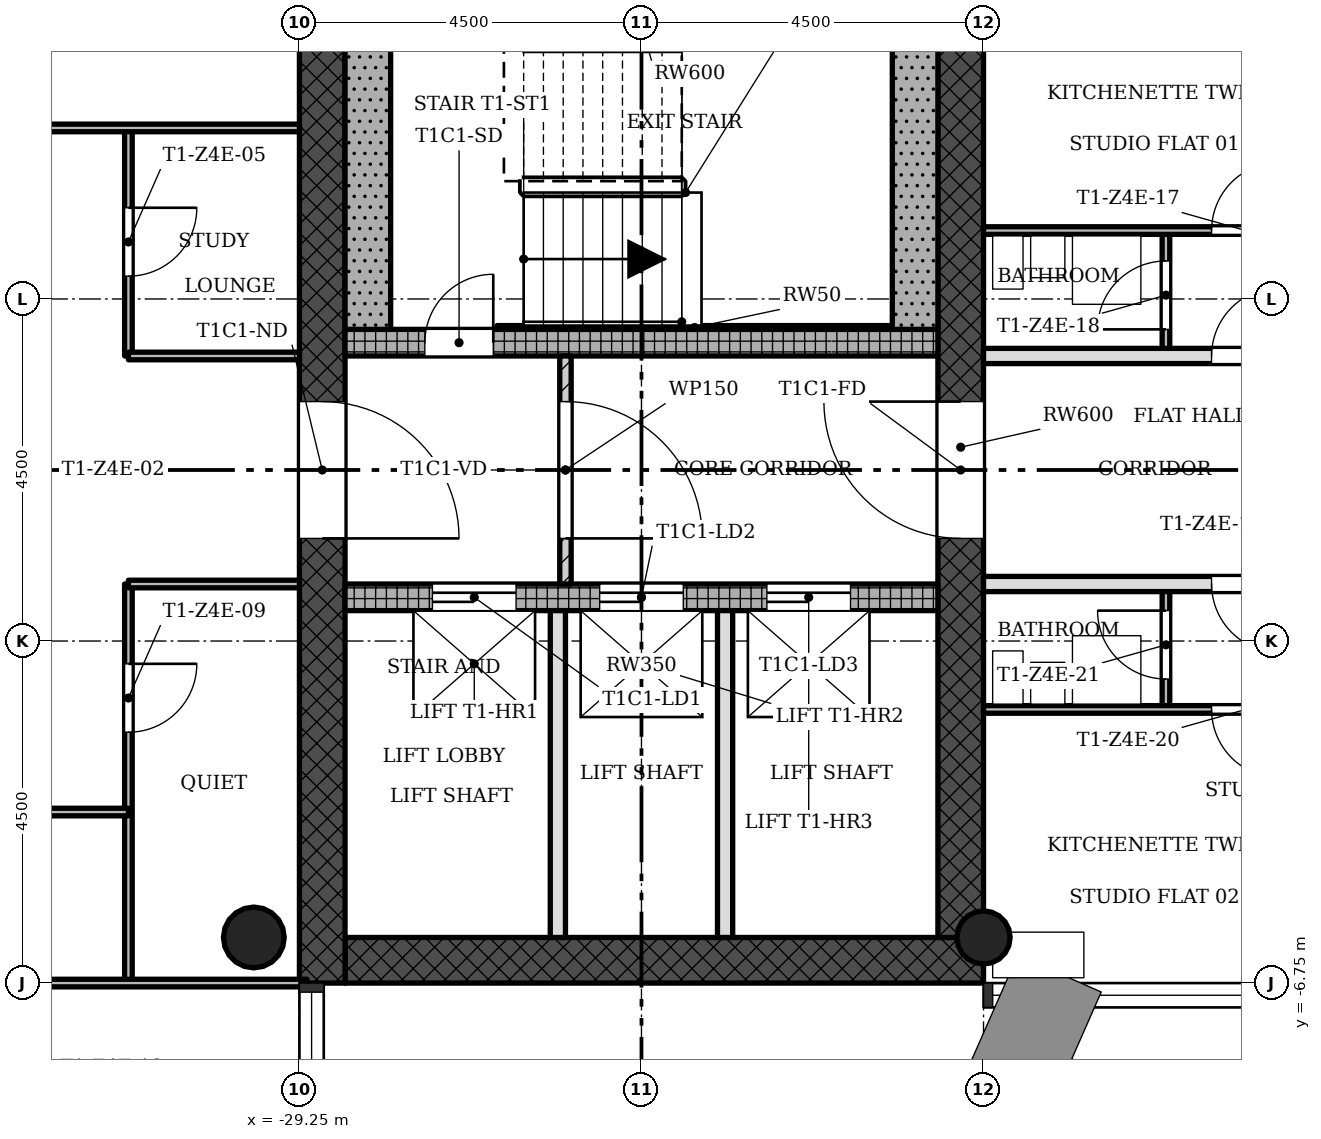
"""IFC4 building model, lengths in metres.
Left out: names, types, materials, properties, quantities, classifications, styles, units other than length and angle.
Written with IfcOpenShell. Run it as: python <this file> out.ifc"""

import sys

from ifc_helpers import new_model, si_unit, direction, frame, frame_2d, origin, origin_2d, place, context, subcontext, project, spatial, rectangle, hollow_circle, extrude, element, fill, save


model = new_model("IFC4")
c1 = context("Model", 3, precision=1e-05, world=origin(), true_north=direction((0.0, 1.0)))
c2 = subcontext(c1, "Body", "Model", "MODEL_VIEW")
j1 = project(units=[si_unit("LENGTHUNIT", "METRE"), si_unit("PLANEANGLEUNIT", "RADIAN")], contexts=[c1])
p1 = place(None, origin())
s1 = spatial("IfcSite", under=j1, at=p1, CompositionType="ELEMENT")
p2 = place(p1, origin())
s2 = spatial("IfcBuilding", under=s1, at=p2, CompositionType="ELEMENT")
p3 = place(p2, frame((0.0, 0.0, 209.6)))
s3 = spatial("IfcBuildingStorey", under=s2, at=p3, CompositionType="ELEMENT", Elevation=209.6)
p4 = place(p3, frame((-28.65, -6.45, 0.0), z_axis=(0.0, 0.0, 1.0), x_axis=(1.0, 0.0, 0.0)))
e1 = element("IfcWall", 1, at=p4, inside=s3, PredefinedType="SHEAR", context=c2, shape_type="SweptSolid", body=[
    extrude(rectangle(XDim=8.4, YDim=0.6, at=frame_2d((4.2, 0.0))), origin(), (0.0, 0.0, 1.0), 3.4),
])
p5 = place(p3, frame((-20.55, -6.15, 0.0), z_axis=(0.0, 0.0, 1.0), x_axis=(0.0, 1.0, 0.0)))
e2 = element("IfcWall", 2, at=p5, inside=s3, PredefinedType="SHEAR", context=c2, shape_type="SweptSolid", body=[
    extrude(rectangle(XDim=12.9, YDim=0.6, at=frame_2d((6.45, 0.0))), origin(), (0.0, 0.0, 1.0), 3.4),
])
p6 = place(p5, frame((5.25, 0.0, 0.0)))
e3 = element("IfcOpeningElement", 3, at=p6, cuts=e2, PredefinedType="OPENING", context=c2, shape_type="SweptSolid", body=[
    extrude(rectangle(XDim=1.8, YDim=2.1, at=frame_2d((0.9, 1.05))), frame((0.0, 0.31, 0.0), z_axis=(0.0, -1.0, 0.0), x_axis=(1.0, 0.0, 0.0)), (0.0, 0.0, 1.0), 0.62),
])
p7 = place(p3, frame((-28.95, 6.15, 0.0), z_axis=(0.0, 0.0, 1.0), x_axis=(0.0, -1.0, 0.0)))
e4 = element("IfcWall", 4, at=p7, inside=s3, PredefinedType="SHEAR", context=c2, shape_type="SweptSolid", body=[
    extrude(rectangle(XDim=12.9, YDim=0.6, at=frame_2d((6.45, 0.0))), origin(), (0.0, 0.0, 1.0), 3.4),
])
p8 = place(p7, frame((5.25, 0.0, 0.0)))
e5 = element("IfcOpeningElement", 5, at=p8, cuts=e4, PredefinedType="OPENING", context=c2, shape_type="SweptSolid", body=[
    extrude(rectangle(XDim=1.8, YDim=2.1, at=frame_2d((0.9, 1.05))), frame((0.0, 0.31, 0.0), z_axis=(0.0, -1.0, 0.0), x_axis=(1.0, 0.0, 0.0)), (0.0, 0.0, 1.0), 0.62),
])
p9 = place(p3, frame((-28.65, -1.675, 0.0), z_axis=(0.0, 0.0, 1.0), x_axis=(1.0, 0.0, 0.0)))
e6 = element("IfcWall", 6, at=p9, inside=s3, PredefinedType="SHEAR", context=c2, shape_type="SweptSolid", body=[
    extrude(rectangle(XDim=7.8, YDim=0.35, at=frame_2d((3.9, 0.0))), origin(), (0.0, 0.0, 1.0), 3.4),
])
p10 = place(p9, frame((1.15, 0.0, 0.0)))
e7 = element("IfcOpeningElement", 7, at=p10, cuts=e6, PredefinedType="OPENING", context=c2, shape_type="SweptSolid", body=[
    extrude(rectangle(XDim=1.1, YDim=2.1, at=frame_2d((0.55, 1.05))), frame((0.0, 0.185, 0.0), z_axis=(0.0, -1.0, 0.0), x_axis=(1.0, 0.0, 0.0)), (0.0, 0.0, 1.0), 0.37),
])
p11 = place(p9, frame((3.35, 0.0, 0.0)))
e8 = element("IfcOpeningElement", 8, at=p11, cuts=e6, PredefinedType="OPENING", context=c2, shape_type="SweptSolid", body=[
    extrude(rectangle(XDim=1.1, YDim=2.1, at=frame_2d((0.55, 1.05))), frame((0.0, 0.185, 0.0), z_axis=(0.0, -1.0, 0.0), x_axis=(1.0, 0.0, 0.0)), (0.0, 0.0, 1.0), 0.37),
])
p12 = place(p9, frame((5.55, 0.0, 0.0)))
e9 = element("IfcOpeningElement", 9, at=p12, cuts=e6, PredefinedType="OPENING", context=c2, shape_type="SweptSolid", body=[
    extrude(rectangle(XDim=1.1, YDim=2.1, at=frame_2d((0.55, 1.05))), frame((0.0, 0.185, 0.0), z_axis=(0.0, -1.0, 0.0), x_axis=(1.0, 0.0, 0.0)), (0.0, 0.0, 1.0), 0.37),
])
p13 = place(p3, frame((-28.65, 1.675, 0.0), z_axis=(0.0, 0.0, 1.0), x_axis=(1.0, 0.0, 0.0)))
e10 = element("IfcWall", 10, at=p13, inside=s3, PredefinedType="SHEAR", context=c2, shape_type="SweptSolid", body=[
    extrude(rectangle(XDim=7.8, YDim=0.35, at=frame_2d((3.9, 0.0))), origin(), (0.0, 0.0, 1.0), 3.4),
])
p14 = place(p13, frame((1.05, 0.0, 0.0)))
e11 = element("IfcOpeningElement", 11, at=p14, cuts=e10, PredefinedType="OPENING", context=c2, shape_type="SweptSolid", body=[
    extrude(rectangle(XDim=0.9, YDim=2.1, at=frame_2d((0.45, 1.05))), frame((0.0, 0.185, 0.0), z_axis=(0.0, -1.0, 0.0), x_axis=(1.0, 0.0, 0.0)), (0.0, 0.0, 1.0), 0.37),
])
p15 = place(p3, frame((-20.25, -6.15, 0.0), z_axis=(0.0, 0.0, 1.0), x_axis=(1.0, 0.0, 0.0)))
e12 = element("IfcColumn", 12, at=p15, inside=s3, PredefinedType="COLUMN", context=c2, shape_type="SweptSolid", body=[
    extrude(hollow_circle(Radius=0.35, WallThickness=0.025, at=origin_2d()), origin(), (0.0, 0.0, 1.0), 3.4),
])
p16 = place(p3, frame((-29.85, -6.15, 0.0), z_axis=(0.0, 0.0, 1.0), x_axis=(1.0, 0.0, 0.0)))
e13 = element("IfcColumn", 13, at=p16, inside=s3, PredefinedType="COLUMN", context=c2, shape_type="SweptSolid", body=[
    extrude(hollow_circle(Radius=0.4, WallThickness=0.028, at=origin_2d()), origin(), (0.0, 0.0, 1.0), 3.4),
])
p17 = place(p3, frame((-25.75, -1.5, 0.0), z_axis=(0.0, 0.0, 1.0), x_axis=(0.0, 1.0, 0.0)))
e14 = element("IfcWall", 14, at=p17, inside=s3, PredefinedType="PARTITIONING", context=c2, shape_type="SweptSolid", body=[
    extrude(rectangle(XDim=3.0, YDim=0.15, at=frame_2d((1.5, 0.0))), origin(), (0.0, 0.0, 1.0), 3.0),
])
p18 = place(p17, frame((0.6, 0.0, 0.0)))
e15 = element("IfcOpeningElement", 15, at=p18, cuts=e14, PredefinedType="OPENING", context=c2, shape_type="SweptSolid", body=[
    extrude(rectangle(XDim=1.8, YDim=2.1, at=frame_2d((0.9, 1.05))), frame((0.0, 0.085, 0.0), z_axis=(0.0, -1.0, 0.0), x_axis=(1.0, 0.0, 0.0)), (0.0, 0.0, 1.0), 0.17),
])
for number, where, z_axis, x_axis in (
    (16, (-25.85, -6.15, 0.0), (0.0, 0.0, 1.0), (0.0, 1.0, 0.0)),
    (17, (-23.65, -6.15, 0.0), (0.0, 0.0, 1.0), (0.0, 1.0, 0.0)),
):
    element("IfcWall", number, at=place(p3, frame(where, z_axis=z_axis, x_axis=x_axis)), inside=s3, PredefinedType="SOLIDWALL", context=c2, shape_type="SweptSolid", body=[
        extrude(rectangle(XDim=4.3, YDim=0.2, at=frame_2d((2.15, 0.0))), origin(), (0.0, 0.0, 1.0), 3.0),
    ])
p19 = place(p3, frame((-31.5, -6.75, 0.0), z_axis=(0.0, 0.0, 1.0), x_axis=(0.0, 1.0, 0.0)))
e18 = element("IfcWall", 18, at=p19, inside=s3, PredefinedType="PARTITIONING", context=c2, shape_type="SweptSolid", body=[
    extrude(rectangle(XDim=5.25, YDim=0.1, at=frame_2d((2.625, 0.0))), origin(), (0.0, 0.0, 1.0), 3.0),
])
p20 = place(p19, frame((3.3, 0.0, 0.0)))
e19 = element("IfcOpeningElement", 19, at=p20, cuts=e18, PredefinedType="OPENING", context=c2, shape_type="SweptSolid", body=[
    extrude(rectangle(XDim=0.9, YDim=2.1, at=frame_2d((0.45, 1.05))), frame((0.0, 0.06, 0.0), z_axis=(0.0, -1.0, 0.0), x_axis=(1.0, 0.0, 0.0)), (0.0, 0.0, 1.0), 0.12),
])
p21 = place(p3, frame((-31.5, 1.5, 0.0), z_axis=(0.0, 0.0, 1.0), x_axis=(0.0, 1.0, 0.0)))
e20 = element("IfcWall", 20, at=p21, inside=s3, PredefinedType="PARTITIONING", context=c2, shape_type="SweptSolid", body=[
    extrude(rectangle(XDim=3.0, YDim=0.1, at=frame_2d((1.5, 0.0))), origin(), (0.0, 0.0, 1.0), 3.0),
])
p22 = place(p21, frame((1.05, 0.0, 0.0)))
e21 = element("IfcOpeningElement", 21, at=p22, cuts=e20, PredefinedType="OPENING", context=c2, shape_type="SweptSolid", body=[
    extrude(rectangle(XDim=0.9, YDim=2.1, at=frame_2d((0.45, 1.05))), frame((0.0, 0.06, 0.0), z_axis=(0.0, -1.0, 0.0), x_axis=(1.0, 0.0, 0.0)), (0.0, 0.0, 1.0), 0.12),
])
p23 = place(p3, frame((-17.85, -3.15, 0.0), z_axis=(0.0, 0.0, 1.0), x_axis=(0.0, 1.0, 0.0)))
e22 = element("IfcWall", 22, at=p23, inside=s3, PredefinedType="PARTITIONING", context=c2, shape_type="SweptSolid", body=[
    extrude(rectangle(XDim=1.65, YDim=0.1, at=frame_2d((0.825, 0.0))), origin(), (0.0, 0.0, 1.0), 3.0),
])
p24 = place(p23, frame((0.4, 0.0, 0.0)))
e23 = element("IfcOpeningElement", 23, at=p24, cuts=e22, PredefinedType="OPENING", context=c2, shape_type="SweptSolid", body=[
    extrude(rectangle(XDim=0.9, YDim=2.1, at=frame_2d((0.45, 1.05))), frame((0.0, 0.06, 0.0), z_axis=(0.0, -1.0, 0.0), x_axis=(1.0, 0.0, 0.0)), (0.0, 0.0, 1.0), 0.12),
])
p25 = place(p3, frame((-17.85, 1.5, 0.0), z_axis=(0.0, 0.0, 1.0), x_axis=(0.0, 1.0, 0.0)))
e24 = element("IfcWall", 24, at=p25, inside=s3, PredefinedType="PARTITIONING", context=c2, shape_type="SweptSolid", body=[
    extrude(rectangle(XDim=1.65, YDim=0.1, at=frame_2d((0.825, 0.0))), origin(), (0.0, 0.0, 1.0), 3.0),
])
p26 = place(p25, frame((0.35, 0.0, 0.0)))
e25 = element("IfcOpeningElement", 25, at=p26, cuts=e24, PredefinedType="OPENING", context=c2, shape_type="SweptSolid", body=[
    extrude(rectangle(XDim=0.9, YDim=2.1, at=frame_2d((0.45, 1.05))), frame((0.0, 0.06, 0.0), z_axis=(0.0, -1.0, 0.0), x_axis=(1.0, 0.0, 0.0)), (0.0, 0.0, 1.0), 0.12),
])
p27 = place(p3, frame((-35.1, -6.75, 0.0), z_axis=(0.0, 0.0, 1.0), x_axis=(1.0, 0.0, 0.0)))
e26 = element("IfcWall", 26, at=p27, inside=s3, PredefinedType="PARTITIONING", context=c2, shape_type="SweptSolid", body=[
    extrude(rectangle(XDim=5.95, YDim=0.1, at=frame_2d((2.975, 0.0))), origin(), (0.0, 0.0, 1.0), 3.0),
])
p28 = place(p3, frame((-35.1, -4.5, 0.0), z_axis=(0.0, 0.0, 1.0), x_axis=(1.0, 0.0, 0.0)))
e27 = element("IfcWall", 27, at=p28, inside=s3, PredefinedType="PARTITIONING", context=c2, shape_type="SweptSolid", body=[
    extrude(rectangle(XDim=3.6, YDim=0.1, at=frame_2d((1.8, 0.0))), origin(), (0.0, 0.0, 1.0), 3.0),
])
p29 = place(p28, frame((1.35, 0.0, 0.0)))
e28 = element("IfcOpeningElement", 28, at=p29, cuts=e27, PredefinedType="OPENING", context=c2, shape_type="SweptSolid", body=[
    extrude(rectangle(XDim=0.9, YDim=2.1, at=frame_2d((0.45, 1.05))), frame((0.0, 0.06, 0.0), z_axis=(0.0, -1.0, 0.0), x_axis=(1.0, 0.0, 0.0)), (0.0, 0.0, 1.0), 0.12),
])
p30 = place(p3, frame((-20.25, -3.15, 0.0), z_axis=(0.0, 0.0, 1.0), x_axis=(1.0, 0.0, 0.0)))
e29 = element("IfcWall", 29, at=p30, inside=s3, PredefinedType="PARTITIONING", context=c2, shape_type="SweptSolid", body=[
    extrude(rectangle(XDim=4.5, YDim=0.1, at=frame_2d((2.25, 0.0))), origin(), (0.0, 0.0, 1.0), 3.0),
])
p31 = place(p30, frame((3.0, 0.0, 0.0)))
e30 = element("IfcOpeningElement", 30, at=p31, cuts=e29, PredefinedType="OPENING", context=c2, shape_type="SweptSolid", body=[
    extrude(rectangle(XDim=0.9, YDim=2.1, at=frame_2d((0.45, 1.05))), frame((0.0, 0.06, 0.0), z_axis=(0.0, -1.0, 0.0), x_axis=(1.0, 0.0, 0.0)), (0.0, 0.0, 1.0), 0.12),
])
p32 = place(p3, frame((-31.5, -1.5, 0.0), z_axis=(0.0, 0.0, 1.0), x_axis=(1.0, 0.0, 0.0)))
e31 = element("IfcWall", 31, at=p32, inside=s3, PredefinedType="PARTITIONING", context=c2, shape_type="SweptSolid", body=[
    extrude(rectangle(XDim=2.25, YDim=0.1, at=frame_2d((1.125, 0.0))), origin(), (0.0, 0.0, 1.0), 3.0),
])
p33 = place(p3, frame((-20.25, -1.5, 0.0), z_axis=(0.0, 0.0, 1.0), x_axis=(1.0, 0.0, 0.0)))
e32 = element("IfcWall", 32, at=p33, inside=s3, PredefinedType="SOLIDWALL", context=c2, shape_type="SweptSolid", body=[
    extrude(rectangle(XDim=4.5, YDim=0.2, at=frame_2d((2.25, 0.0))), origin(), (0.0, 0.0, 1.0), 3.0),
])
p34 = place(p33, frame((3.0, 0.0, 0.0)))
e33 = element("IfcOpeningElement", 33, at=p34, cuts=e32, PredefinedType="OPENING", context=c2, shape_type="SweptSolid", body=[
    extrude(rectangle(XDim=0.9, YDim=2.1, at=frame_2d((0.45, 1.05))), frame((0.0, 0.11, 0.0), z_axis=(0.0, -1.0, 0.0), x_axis=(1.0, 0.0, 0.0)), (0.0, 0.0, 1.0), 0.22),
])
p35 = place(p3, frame((-31.5, 1.5, 0.0), z_axis=(0.0, 0.0, 1.0), x_axis=(1.0, 0.0, 0.0)))
e34 = element("IfcWall", 34, at=p35, inside=s3, PredefinedType="PARTITIONING", context=c2, shape_type="SweptSolid", body=[
    extrude(rectangle(XDim=2.25, YDim=0.1, at=frame_2d((1.125, 0.0))), origin(), (0.0, 0.0, 1.0), 3.0),
])
p36 = place(p3, frame((-20.25, 1.5, 0.0), z_axis=(0.0, 0.0, 1.0), x_axis=(1.0, 0.0, 0.0)))
e35 = element("IfcWall", 35, at=p36, inside=s3, PredefinedType="SOLIDWALL", context=c2, shape_type="SweptSolid", body=[
    extrude(rectangle(XDim=4.5, YDim=0.2, at=frame_2d((2.25, 0.0))), origin(), (0.0, 0.0, 1.0), 3.0),
])
p37 = place(p36, frame((3.0, 0.0, 0.0)))
e36 = element("IfcOpeningElement", 36, at=p37, cuts=e35, PredefinedType="OPENING", context=c2, shape_type="SweptSolid", body=[
    extrude(rectangle(XDim=0.9, YDim=2.1, at=frame_2d((0.45, 1.05))), frame((0.0, 0.11, 0.0), z_axis=(0.0, -1.0, 0.0), x_axis=(1.0, 0.0, 0.0)), (0.0, 0.0, 1.0), 0.22),
])
p38 = place(p3, frame((-20.25, 3.15, 0.0), z_axis=(0.0, 0.0, 1.0), x_axis=(1.0, 0.0, 0.0)))
e37 = element("IfcWall", 37, at=p38, inside=s3, PredefinedType="PARTITIONING", context=c2, shape_type="SweptSolid", body=[
    extrude(rectangle(XDim=4.5, YDim=0.1, at=frame_2d((2.25, 0.0))), origin(), (0.0, 0.0, 1.0), 3.0),
])
p39 = place(p38, frame((3.0, 0.0, 0.0)))
e38 = element("IfcOpeningElement", 38, at=p39, cuts=e37, PredefinedType="OPENING", context=c2, shape_type="SweptSolid", body=[
    extrude(rectangle(XDim=0.9, YDim=2.1, at=frame_2d((0.45, 1.05))), frame((0.0, 0.06, 0.0), z_axis=(0.0, -1.0, 0.0), x_axis=(1.0, 0.0, 0.0)), (0.0, 0.0, 1.0), 0.12),
])
p40 = place(p3, frame((-35.1, 4.5, 0.0), z_axis=(0.0, 0.0, 1.0), x_axis=(1.0, 0.0, 0.0)))
e39 = element("IfcWall", 39, at=p40, inside=s3, PredefinedType="PARTITIONING", context=c2, shape_type="SweptSolid", body=[
    extrude(rectangle(XDim=5.85, YDim=0.1, at=frame_2d((2.925, 0.0))), origin(), (0.0, 0.0, 1.0), 3.0),
])
p41 = place(p40, frame((1.35, 0.0, 0.0)))
e40 = element("IfcOpeningElement", 40, at=p41, cuts=e39, PredefinedType="OPENING", context=c2, shape_type="SweptSolid", body=[
    extrude(rectangle(XDim=0.9, YDim=2.1, at=frame_2d((0.45, 1.05))), frame((0.0, 0.06, 0.0), z_axis=(0.0, -1.0, 0.0), x_axis=(1.0, 0.0, 0.0)), (0.0, 0.0, 1.0), 0.12),
])
for number, where, z_axis, x_axis in (
    (41, (-21.15, 1.85, 0.0), (0.0, 0.0, 1.0), (0.0, 1.0, 0.0)),
    (42, (-28.35, 1.85, 0.0), (0.0, 0.0, 1.0), (0.0, 1.0, 0.0)),
):
    element("IfcWall", number, at=place(p3, frame(where, z_axis=z_axis, x_axis=x_axis)), inside=s3, PredefinedType="SHEAR", context=c2, shape_type="SweptSolid", body=[
        extrude(rectangle(XDim=4.3, YDim=0.6, at=frame_2d((2.15, 0.0))), origin(), (0.0, 0.0, 1.0), 3.4),
    ])
p42 = place(p3, frame((-26.65, 1.875, 0.0), z_axis=(0.0, 0.0, 1.0), x_axis=(1.0, 0.0, 0.0)))
e43 = element("IfcWall", 43, at=p42, inside=s3, PredefinedType="SHEAR", context=c2, shape_type="SweptSolid", body=[
    extrude(rectangle(XDim=5.2, YDim=0.05, at=frame_2d((2.6, 0.0))), origin(), (0.0, 0.0, 1.0), 3.4),
])
p43 = place(p18, origin())
e44 = element("IfcDoor", 44, at=p43, inside=s3, OperationType="SINGLE_SWING_LEFT", PredefinedType="DOOR", context=c2, shape_type="SweptSolid", body=[
    extrude(rectangle(XDim=1.8, YDim=2.1, at=frame_2d((0.9, 1.05))), frame((0.0, 0.025, 0.0), z_axis=(0.0, -1.0, 0.0), x_axis=(1.0, 0.0, 0.0)), (0.0, 0.0, 1.0), 0.05),
])
fill(e15, e44)
p44 = place(p22, origin())
e45 = element("IfcDoor", 45, at=p44, inside=s3, OperationType="SINGLE_SWING_RIGHT", PredefinedType="DOOR", context=c2, shape_type="SweptSolid", body=[
    extrude(rectangle(XDim=0.9, YDim=2.1, at=frame_2d((0.45, 1.05))), frame((0.0, 0.025, 0.0), z_axis=(0.0, -1.0, 0.0), x_axis=(1.0, 0.0, 0.0)), (0.0, 0.0, 1.0), 0.05),
])
fill(e21, e45)
p45 = place(p20, origin())
e46 = element("IfcDoor", 46, at=p45, inside=s3, OperationType="SINGLE_SWING_RIGHT", PredefinedType="DOOR", context=c2, shape_type="SweptSolid", body=[
    extrude(rectangle(XDim=0.9, YDim=2.1, at=frame_2d((0.45, 1.05))), frame((0.0, 0.025, 0.0), z_axis=(0.0, -1.0, 0.0), x_axis=(1.0, 0.0, 0.0)), (0.0, 0.0, 1.0), 0.05),
])
fill(e19, e46)
p46 = place(p37, origin())
e47 = element("IfcDoor", 47, at=p46, inside=s3, OperationType="SINGLE_SWING_LEFT", PredefinedType="DOOR", context=c2, shape_type="SweptSolid", body=[
    extrude(rectangle(XDim=0.9, YDim=2.1, at=frame_2d((0.45, 1.05))), frame((0.0, 0.025, 0.0), z_axis=(0.0, -1.0, 0.0), x_axis=(1.0, 0.0, 0.0)), (0.0, 0.0, 1.0), 0.05),
])
fill(e36, e47)
p47 = place(p39, origin())
e48 = element("IfcDoor", 48, at=p47, inside=s3, OperationType="SINGLE_SWING_LEFT", PredefinedType="DOOR", context=c2, shape_type="SweptSolid", body=[
    extrude(rectangle(XDim=0.9, YDim=2.1, at=frame_2d((0.45, 1.05))), frame((0.0, 0.025, 0.0), z_axis=(0.0, -1.0, 0.0), x_axis=(1.0, 0.0, 0.0)), (0.0, 0.0, 1.0), 0.05),
])
fill(e38, e48)
p48 = place(p26, origin())
e49 = element("IfcDoor", 49, at=p48, inside=s3, OperationType="SINGLE_SWING_RIGHT", PredefinedType="DOOR", context=c2, shape_type="SweptSolid", body=[
    extrude(rectangle(XDim=0.9, YDim=2.1, at=frame_2d((0.45, 1.05))), frame((0.0, 0.025, 0.0), z_axis=(0.0, -1.0, 0.0), x_axis=(1.0, 0.0, 0.0)), (0.0, 0.0, 1.0), 0.05),
])
fill(e25, e49)
p49 = place(p34, origin())
e50 = element("IfcDoor", 50, at=p49, inside=s3, OperationType="SINGLE_SWING_RIGHT", PredefinedType="DOOR", context=c2, shape_type="SweptSolid", body=[
    extrude(rectangle(XDim=0.9, YDim=2.1, at=frame_2d((0.45, 1.05))), frame((0.0, 0.025, 0.0), z_axis=(0.0, -1.0, 0.0), x_axis=(1.0, 0.0, 0.0)), (0.0, 0.0, 1.0), 0.05),
])
fill(e33, e50)
p50 = place(p31, origin())
e51 = element("IfcDoor", 51, at=p50, inside=s3, OperationType="SINGLE_SWING_RIGHT", PredefinedType="DOOR", context=c2, shape_type="SweptSolid", body=[
    extrude(rectangle(XDim=0.9, YDim=2.1, at=frame_2d((0.45, 1.05))), frame((0.0, 0.025, 0.0), z_axis=(0.0, -1.0, 0.0), x_axis=(1.0, 0.0, 0.0)), (0.0, 0.0, 1.0), 0.05),
])
fill(e30, e51)
p51 = place(p24, origin())
e52 = element("IfcDoor", 52, at=p51, inside=s3, OperationType="SINGLE_SWING_LEFT", PredefinedType="DOOR", context=c2, shape_type="SweptSolid", body=[
    extrude(rectangle(XDim=0.9, YDim=2.1, at=frame_2d((0.45, 1.05))), frame((0.0, 0.025, 0.0), z_axis=(0.0, -1.0, 0.0), x_axis=(1.0, 0.0, 0.0)), (0.0, 0.0, 1.0), 0.05),
])
fill(e23, e52)
p52 = place(p14, origin())
e53 = element("IfcDoor", 53, at=p52, inside=s3, OperationType="SINGLE_SWING_LEFT", PredefinedType="DOOR", context=c2, shape_type="SweptSolid", body=[
    extrude(rectangle(XDim=0.9, YDim=2.1, at=frame_2d((0.45, 1.05))), frame((0.0, 0.025, 0.0), z_axis=(0.0, -1.0, 0.0), x_axis=(1.0, 0.0, 0.0)), (0.0, 0.0, 1.0), 0.05),
])
fill(e11, e53)
p53 = place(p10, origin())
e54 = element("IfcDoor", 54, at=p53, inside=s3, OperationType="SLIDING_TO_LEFT", PredefinedType="DOOR", context=c2, shape_type="SweptSolid", body=[
    extrude(rectangle(XDim=1.1, YDim=2.1, at=frame_2d((0.55, 1.05))), frame((0.0, 0.025, 0.0), z_axis=(0.0, -1.0, 0.0), x_axis=(1.0, 0.0, 0.0)), (0.0, 0.0, 1.0), 0.05),
])
fill(e7, e54)
p54 = place(p11, origin())
e55 = element("IfcDoor", 55, at=p54, inside=s3, OperationType="SLIDING_TO_LEFT", PredefinedType="DOOR", context=c2, shape_type="SweptSolid", body=[
    extrude(rectangle(XDim=1.1, YDim=2.1, at=frame_2d((0.55, 1.05))), frame((0.0, 0.025, 0.0), z_axis=(0.0, -1.0, 0.0), x_axis=(1.0, 0.0, 0.0)), (0.0, 0.0, 1.0), 0.05),
])
fill(e8, e55)
p55 = place(p12, origin())
e56 = element("IfcDoor", 56, at=p55, inside=s3, OperationType="SLIDING_TO_LEFT", PredefinedType="DOOR", context=c2, shape_type="SweptSolid", body=[
    extrude(rectangle(XDim=1.1, YDim=2.1, at=frame_2d((0.55, 1.05))), frame((0.0, 0.025, 0.0), z_axis=(0.0, -1.0, 0.0), x_axis=(1.0, 0.0, 0.0)), (0.0, 0.0, 1.0), 0.05),
])
fill(e9, e56)
p56 = place(p8, origin())
e57 = element("IfcDoor", 57, at=p56, inside=s3, OperationType="SINGLE_SWING_LEFT", PredefinedType="DOOR", context=c2, shape_type="SweptSolid", body=[
    extrude(rectangle(XDim=1.8, YDim=2.1, at=frame_2d((0.9, 1.05))), frame((0.0, 0.025, 0.0), z_axis=(0.0, -1.0, 0.0), x_axis=(1.0, 0.0, 0.0)), (0.0, 0.0, 1.0), 0.05),
])
fill(e5, e57)
p57 = place(p6, origin())
e58 = element("IfcDoor", 58, at=p57, inside=s3, OperationType="SINGLE_SWING_LEFT", PredefinedType="DOOR", context=c2, shape_type="SweptSolid", body=[
    extrude(rectangle(XDim=1.8, YDim=2.1, at=frame_2d((0.9, 1.05))), frame((0.0, 0.025, 0.0), z_axis=(0.0, -1.0, 0.0), x_axis=(1.0, 0.0, 0.0)), (0.0, 0.0, 1.0), 0.05),
])
fill(e3, e58)
save(model, sys.argv[1])
